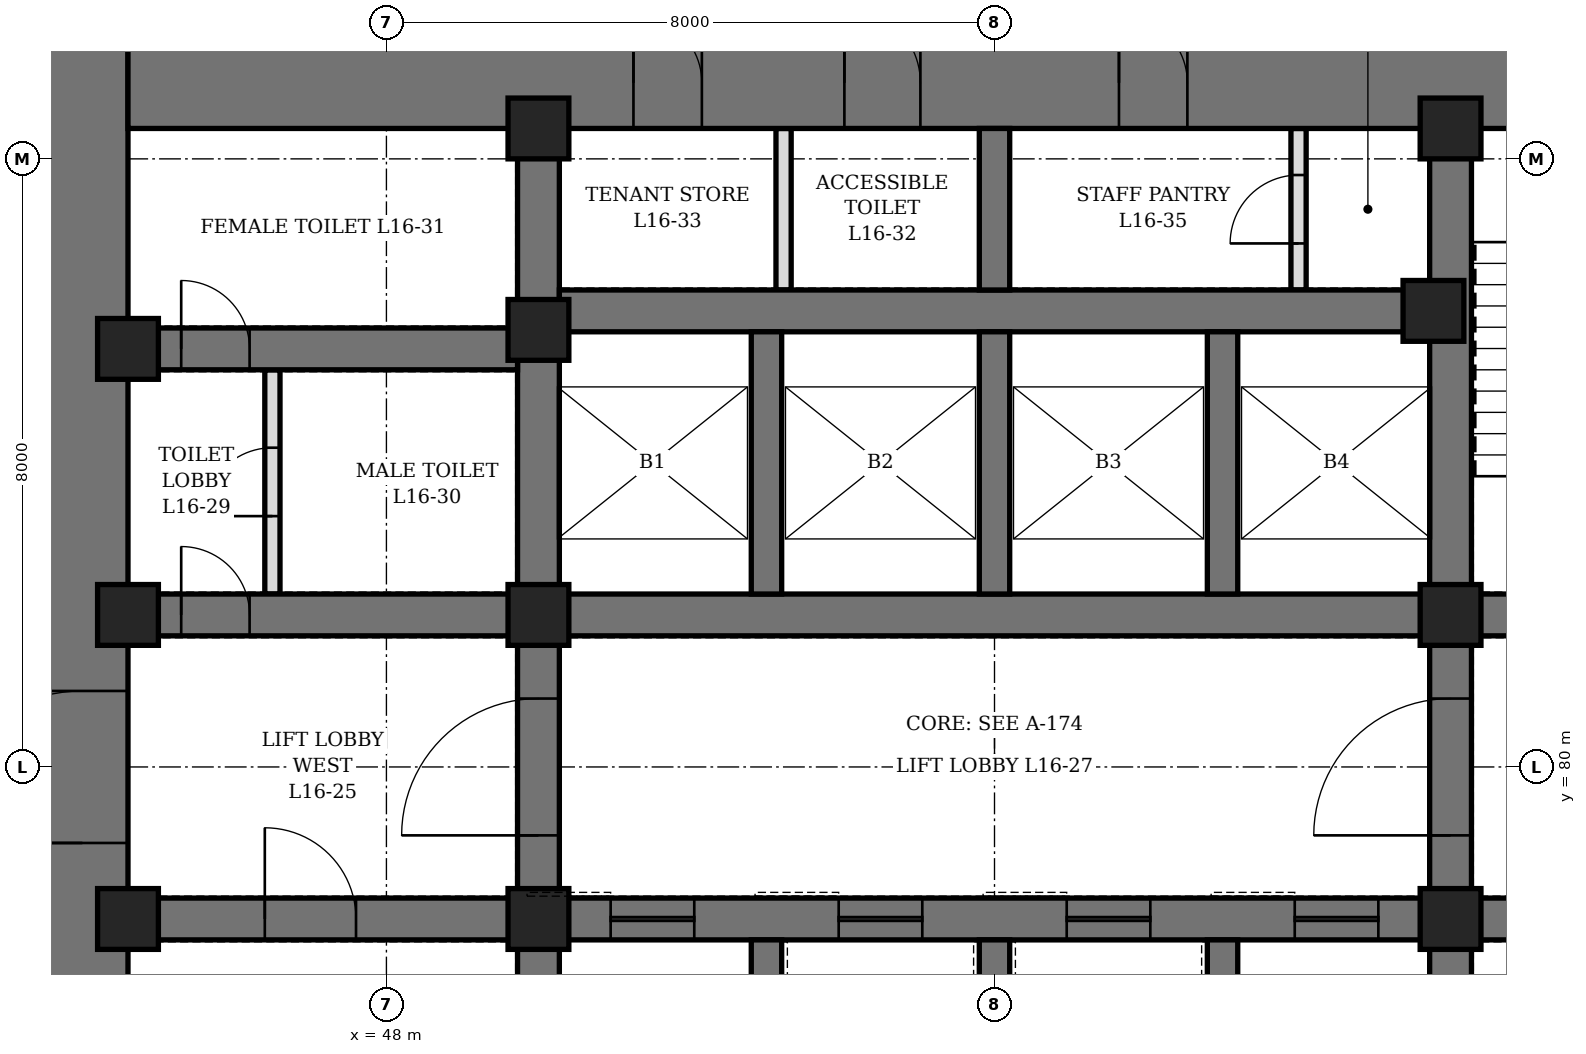
"""IFC4 building model, lengths in metres.
Left out: names, types, materials, properties, quantities, classifications, styles, units other than length and angle.
Written with IfcOpenShell. Run it as: python <this file> out.ifc"""

import sys

from ifc_helpers import new_model, si_unit, direction, frame, frame_2d, origin, origin_2d, place, context, subcontext, project, spatial, rectangle, hollow_rectangle, extrude, element, fill, save


model = new_model("IFC4")
c1 = context("Model", 3, precision=1e-05, world=origin(), true_north=direction((0.0, 1.0)))
c2 = subcontext(c1, "Body", "Model", "MODEL_VIEW")
j1 = project(units=[si_unit("LENGTHUNIT", "METRE"), si_unit("PLANEANGLEUNIT", "RADIAN")], contexts=[c1])
p1 = place(None, origin())
s1 = spatial("IfcSite", under=j1, at=p1, CompositionType="ELEMENT")
p2 = place(p1, origin())
s2 = spatial("IfcBuilding", under=s1, at=p2, CompositionType="ELEMENT")
p3 = place(p2, frame((0.0, 0.0, 76.9)))
s3 = spatial("IfcBuildingStorey", under=s2, at=p3, CompositionType="ELEMENT", Elevation=76.9)
p4 = place(p3, frame((44.0, 70.4, 0.0), z_axis=(0.0, 0.0, 1.0), x_axis=(0.0, 1.0, 0.0)))
e1 = element("IfcWall", 1, at=p4, inside=s3, PredefinedType="SHEAR", context=c2, shape_type="SweptSolid", body=[
    extrude(rectangle(XDim=19.2, YDim=1.2, at=frame_2d((9.6, 0.0))), origin(), (0.0, 0.0, 1.0), 4.2),
])
p5 = place(p4, frame((8.6, 0.0, 0.0)))
e2 = element("IfcOpeningElement", 2, at=p5, cuts=e1, PredefinedType="OPENING", context=c2, shape_type="SweptSolid", body=[
    extrude(rectangle(XDim=2.0, YDim=2.4, at=frame_2d((1.0, 1.2))), frame((0.0, 0.61, 0.0), z_axis=(0.0, -1.0, 0.0), x_axis=(1.0, 0.0, 0.0)), (0.0, 0.0, 1.0), 1.22),
])
p6 = place(p3, frame((44.6, 89.0, 0.0), z_axis=(0.0, 0.0, 1.0), x_axis=(1.0, 0.0, 0.0)))
e3 = element("IfcWall", 3, at=p6, inside=s3, PredefinedType="SHEAR", context=c2, shape_type="SweptSolid", body=[
    extrude(rectangle(XDim=22.8, YDim=1.2, at=frame_2d((11.4, 0.0))), origin(), (0.0, 0.0, 1.0), 4.2),
])
p7 = place(p6, frame((9.425, 0.0, 0.0)))
e4 = element("IfcOpeningElement", 4, at=p7, cuts=e3, PredefinedType="OPENING", context=c2, shape_type="SweptSolid", body=[
    extrude(rectangle(XDim=1.0, YDim=2.1, at=frame_2d((0.5, 1.05))), frame((0.0, 0.61, 0.0), z_axis=(0.0, -1.0, 0.0), x_axis=(1.0, 0.0, 0.0)), (0.0, 0.0, 1.0), 1.22),
])
p8 = place(p6, frame((6.65, 0.0, 0.0)))
e5 = element("IfcOpeningElement", 5, at=p8, cuts=e3, PredefinedType="OPENING", context=c2, shape_type="SweptSolid", body=[
    extrude(rectangle(XDim=0.9, YDim=2.1, at=frame_2d((0.45, 1.05))), frame((0.0, 0.61, 0.0), z_axis=(0.0, -1.0, 0.0), x_axis=(1.0, 0.0, 0.0)), (0.0, 0.0, 1.0), 1.22),
])
p9 = place(p6, frame((13.038, 0.0, 0.0)))
e6 = element("IfcOpeningElement", 6, at=p9, cuts=e3, PredefinedType="OPENING", context=c2, shape_type="SweptSolid", body=[
    extrude(rectangle(XDim=0.9, YDim=2.1, at=frame_2d((0.45, 1.05))), frame((0.0, 0.61, 0.0), z_axis=(0.0, -1.0, 0.0), x_axis=(1.0, 0.0, 0.0)), (0.0, 0.0, 1.0), 1.22),
])
p10 = place(p3, frame((50.0, 71.6, 0.0), z_axis=(0.0, 0.0, 1.0), x_axis=(0.0, 1.0, 0.0)))
e7 = element("IfcWall", 7, at=p10, inside=s3, PredefinedType="SHEAR", context=c2, shape_type="SweptSolid", body=[
    extrude(rectangle(XDim=16.8, YDim=0.55, at=frame_2d((8.4, 0.0))), origin(), (0.0, 0.0, 1.0), 4.2),
])
p11 = place(p10, frame((7.5, 0.0, 0.0)))
e8 = element("IfcOpeningElement", 8, at=p11, cuts=e7, PredefinedType="OPENING", context=c2, shape_type="SweptSolid", body=[
    extrude(rectangle(XDim=1.8, YDim=2.4, at=frame_2d((0.9, 1.2))), frame((0.0, 0.285, 0.0), z_axis=(0.0, -1.0, 0.0), x_axis=(1.0, 0.0, 0.0)), (0.0, 0.0, 1.0), 0.57),
])
p12 = place(p3, frame((62.0, 71.6, 0.0), z_axis=(0.0, 0.0, 1.0), x_axis=(0.0, 1.0, 0.0)))
e9 = element("IfcWall", 9, at=p12, inside=s3, PredefinedType="SHEAR", context=c2, shape_type="SweptSolid", body=[
    extrude(rectangle(XDim=16.8, YDim=0.55, at=frame_2d((8.4, 0.0))), origin(), (0.0, 0.0, 1.0), 4.2),
])
p13 = place(p12, frame((7.5, 0.0, 0.0)))
e10 = element("IfcOpeningElement", 10, at=p13, cuts=e9, PredefinedType="OPENING", context=c2, shape_type="SweptSolid", body=[
    extrude(rectangle(XDim=1.8, YDim=2.4, at=frame_2d((0.9, 1.2))), frame((0.0, 0.285, 0.0), z_axis=(0.0, -1.0, 0.0), x_axis=(1.0, 0.0, 0.0)), (0.0, 0.0, 1.0), 0.57),
])
p14 = place(p3, frame((44.6, 78.0, 0.0), z_axis=(0.0, 0.0, 1.0), x_axis=(1.0, 0.0, 0.0)))
e11 = element("IfcWall", 11, at=p14, inside=s3, PredefinedType="SHEAR", context=c2, shape_type="SweptSolid", body=[
    extrude(rectangle(XDim=5.125, YDim=0.55, at=frame_2d((2.562, 0.0))), origin(), (0.0, 0.0, 1.0), 4.2),
])
p15 = place(p14, frame((1.8, 0.0, 0.0)))
e12 = element("IfcOpeningElement", 12, at=p15, cuts=e11, PredefinedType="OPENING", context=c2, shape_type="SweptSolid", body=[
    extrude(rectangle(XDim=1.2, YDim=2.1, at=frame_2d((0.6, 1.05))), frame((0.0, 0.285, 0.0), z_axis=(0.0, -1.0, 0.0), x_axis=(1.0, 0.0, 0.0)), (0.0, 0.0, 1.0), 0.57),
])
p16 = place(p3, frame((44.6, 82.0, 0.0), z_axis=(0.0, 0.0, 1.0), x_axis=(1.0, 0.0, 0.0)))
e13 = element("IfcWall", 13, at=p16, inside=s3, PredefinedType="SHEAR", context=c2, shape_type="SweptSolid", body=[
    extrude(rectangle(XDim=5.125, YDim=0.55, at=frame_2d((2.562, 0.0))), origin(), (0.0, 0.0, 1.0), 4.2),
])
p17 = place(p16, frame((0.7, 0.0, 0.0)))
e14 = element("IfcOpeningElement", 14, at=p17, cuts=e13, PredefinedType="OPENING", context=c2, shape_type="SweptSolid", body=[
    extrude(rectangle(XDim=0.9, YDim=2.1, at=frame_2d((0.45, 1.05))), frame((0.0, 0.285, 0.0), z_axis=(0.0, -1.0, 0.0), x_axis=(1.0, 0.0, 0.0)), (0.0, 0.0, 1.0), 0.57),
])
p18 = place(p3, frame((44.6, 85.5, 0.0), z_axis=(0.0, 0.0, 1.0), x_axis=(1.0, 0.0, 0.0)))
e15 = element("IfcWall", 15, at=p18, inside=s3, PredefinedType="SHEAR", context=c2, shape_type="SweptSolid", body=[
    extrude(rectangle(XDim=5.125, YDim=0.55, at=frame_2d((2.562, 0.0))), origin(), (0.0, 0.0, 1.0), 4.2),
])
p19 = place(p18, frame((0.7, 0.0, 0.0)))
e16 = element("IfcOpeningElement", 16, at=p19, cuts=e15, PredefinedType="OPENING", context=c2, shape_type="SweptSolid", body=[
    extrude(rectangle(XDim=0.9, YDim=2.1, at=frame_2d((0.45, 1.05))), frame((0.0, 0.285, 0.0), z_axis=(0.0, -1.0, 0.0), x_axis=(1.0, 0.0, 0.0)), (0.0, 0.0, 1.0), 0.57),
])
p20 = place(p3, frame((62.275, 78.0, 0.0), z_axis=(0.0, 0.0, 1.0), x_axis=(1.0, 0.0, 0.0)))
e17 = element("IfcWall", 17, at=p20, inside=s3, PredefinedType="SHEAR", context=c2, shape_type="SweptSolid", body=[
    extrude(rectangle(XDim=5.125, YDim=0.55, at=frame_2d((2.562, 0.0))), origin(), (0.0, 0.0, 1.0), 4.2),
])
p21 = place(p20, frame((2.125, 0.0, 0.0)))
e18 = element("IfcOpeningElement", 18, at=p21, cuts=e17, PredefinedType="OPENING", context=c2, shape_type="SweptSolid", body=[
    extrude(rectangle(XDim=1.2, YDim=2.1, at=frame_2d((0.6, 1.05))), frame((0.0, 0.285, 0.0), z_axis=(0.0, -1.0, 0.0), x_axis=(1.0, 0.0, 0.0)), (0.0, 0.0, 1.0), 0.57),
])
p22 = place(p3, frame((62.275, 82.0, 0.0), z_axis=(0.0, 0.0, 1.0), x_axis=(1.0, 0.0, 0.0)))
e19 = element("IfcWall", 19, at=p22, inside=s3, PredefinedType="SHEAR", context=c2, shape_type="SweptSolid", body=[
    extrude(rectangle(XDim=5.125, YDim=0.55, at=frame_2d((2.562, 0.0))), origin(), (0.0, 0.0, 1.0), 4.2),
])
p23 = place(p22, frame((2.125, 0.0, 0.0)))
e20 = element("IfcOpeningElement", 20, at=p23, cuts=e19, PredefinedType="OPENING", context=c2, shape_type="SweptSolid", body=[
    extrude(rectangle(XDim=1.2, YDim=2.1, at=frame_2d((0.6, 1.05))), frame((0.0, 0.285, 0.0), z_axis=(0.0, -1.0, 0.0), x_axis=(1.0, 0.0, 0.0)), (0.0, 0.0, 1.0), 0.57),
])
p24 = place(p3, frame((50.275, 78.0, 0.0), z_axis=(0.0, 0.0, 1.0), x_axis=(1.0, 0.0, 0.0)))
e21 = element("IfcWall", 21, at=p24, inside=s3, PredefinedType="SHEAR", context=c2, shape_type="SweptSolid", body=[
    extrude(rectangle(XDim=11.45, YDim=0.55, at=frame_2d((5.725, 0.0))), origin(), (0.0, 0.0, 1.0), 4.2),
])
p25 = place(p24, frame((0.675, 0.0, 0.0)))
e22 = element("IfcOpeningElement", 22, at=p25, cuts=e21, PredefinedType="OPENING", context=c2, shape_type="SweptSolid", body=[
    extrude(rectangle(XDim=1.1, YDim=2.2, at=frame_2d((0.55, 1.1))), frame((0.0, 0.285, 0.0), z_axis=(0.0, -1.0, 0.0), x_axis=(1.0, 0.0, 0.0)), (0.0, 0.0, 1.0), 0.57),
])
p26 = place(p24, frame((3.675, 0.0, 0.0)))
e23 = element("IfcOpeningElement", 23, at=p26, cuts=e21, PredefinedType="OPENING", context=c2, shape_type="SweptSolid", body=[
    extrude(rectangle(XDim=1.1, YDim=2.2, at=frame_2d((0.55, 1.1))), frame((0.0, 0.285, 0.0), z_axis=(0.0, -1.0, 0.0), x_axis=(1.0, 0.0, 0.0)), (0.0, 0.0, 1.0), 0.57),
])
p27 = place(p24, frame((6.675, 0.0, 0.0)))
e24 = element("IfcOpeningElement", 24, at=p27, cuts=e21, PredefinedType="OPENING", context=c2, shape_type="SweptSolid", body=[
    extrude(rectangle(XDim=1.1, YDim=2.2, at=frame_2d((0.55, 1.1))), frame((0.0, 0.285, 0.0), z_axis=(0.0, -1.0, 0.0), x_axis=(1.0, 0.0, 0.0)), (0.0, 0.0, 1.0), 0.57),
])
p28 = place(p24, frame((9.675, 0.0, 0.0)))
e25 = element("IfcOpeningElement", 25, at=p28, cuts=e21, PredefinedType="OPENING", context=c2, shape_type="SweptSolid", body=[
    extrude(rectangle(XDim=1.1, YDim=2.2, at=frame_2d((0.55, 1.1))), frame((0.0, 0.285, 0.0), z_axis=(0.0, -1.0, 0.0), x_axis=(1.0, 0.0, 0.0)), (0.0, 0.0, 1.0), 0.57),
])
for number, where, z_axis, x_axis in (
    (26, (50.275, 82.0, 0.0), (0.0, 0.0, 1.0), (1.0, 0.0, 0.0)),
    (27, (50.275, 86.0, 0.0), (0.0, 0.0, 1.0), (1.0, 0.0, 0.0)),
):
    element("IfcWall", number, at=place(p3, frame(where, z_axis=z_axis, x_axis=x_axis)), inside=s3, PredefinedType="SHEAR", context=c2, shape_type="SweptSolid", body=[
        extrude(rectangle(XDim=11.45, YDim=0.55, at=frame_2d((5.725, 0.0))), origin(), (0.0, 0.0, 1.0), 4.2),
    ])
p29 = place(p3, frame((53.0, 74.2, 0.0), z_axis=(0.0, 0.0, 1.0), x_axis=(0.0, 1.0, 0.0)))
e28 = element("IfcWall", 28, at=p29, inside=s3, PredefinedType="SHEAR", context=c2, shape_type="SweptSolid", body=[
    extrude(rectangle(XDim=3.525, YDim=0.4, at=frame_2d((1.763, 0.0))), origin(), (0.0, 0.0, 1.0), 4.2),
])
p30 = place(p3, frame((53.0, 82.275, 0.0), z_axis=(0.0, 0.0, 1.0), x_axis=(0.0, 1.0, 0.0)))
e29 = element("IfcWall", 29, at=p30, inside=s3, PredefinedType="SHEAR", context=c2, shape_type="SweptSolid", body=[
    extrude(rectangle(XDim=3.45, YDim=0.4, at=frame_2d((1.725, 0.0))), origin(), (0.0, 0.0, 1.0), 4.2),
])
p31 = place(p3, frame((56.0, 74.2, 0.0), z_axis=(0.0, 0.0, 1.0), x_axis=(0.0, 1.0, 0.0)))
e30 = element("IfcWall", 30, at=p31, inside=s3, PredefinedType="SHEAR", context=c2, shape_type="SweptSolid", body=[
    extrude(rectangle(XDim=3.525, YDim=0.4, at=frame_2d((1.763, 0.0))), origin(), (0.0, 0.0, 1.0), 4.2),
])
p32 = place(p3, frame((56.0, 82.275, 0.0), z_axis=(0.0, 0.0, 1.0), x_axis=(0.0, 1.0, 0.0)))
e31 = element("IfcWall", 31, at=p32, inside=s3, PredefinedType="SHEAR", context=c2, shape_type="SweptSolid", body=[
    extrude(rectangle(XDim=3.45, YDim=0.4, at=frame_2d((1.725, 0.0))), origin(), (0.0, 0.0, 1.0), 4.2),
])
p33 = place(p3, frame((59.0, 74.2, 0.0), z_axis=(0.0, 0.0, 1.0), x_axis=(0.0, 1.0, 0.0)))
e32 = element("IfcWall", 32, at=p33, inside=s3, PredefinedType="SHEAR", context=c2, shape_type="SweptSolid", body=[
    extrude(rectangle(XDim=3.525, YDim=0.4, at=frame_2d((1.763, 0.0))), origin(), (0.0, 0.0, 1.0), 4.2),
])
p34 = place(p3, frame((59.0, 82.275, 0.0), z_axis=(0.0, 0.0, 1.0), x_axis=(0.0, 1.0, 0.0)))
e33 = element("IfcWall", 33, at=p34, inside=s3, PredefinedType="SHEAR", context=c2, shape_type="SweptSolid", body=[
    extrude(rectangle(XDim=3.45, YDim=0.4, at=frame_2d((1.725, 0.0))), origin(), (0.0, 0.0, 1.0), 4.2),
])
p35 = place(p3, frame((56.0, 86.275, 0.0), z_axis=(0.0, 0.0, 1.0), x_axis=(0.0, 1.0, 0.0)))
e34 = element("IfcWall", 34, at=p35, inside=s3, PredefinedType="SHEAR", context=c2, shape_type="SweptSolid", body=[
    extrude(rectangle(XDim=2.125, YDim=0.4, at=frame_2d((1.062, 0.0))), origin(), (0.0, 0.0, 1.0), 4.2),
])
for number, where, z_axis, x_axis in (
    (35, (44.6, 78.0, 0.0), (0.0, 0.0, 1.0), (1.0, 0.0, 0.0)),
    (36, (44.6, 82.0, 0.0), (0.0, 0.0, 1.0), (1.0, 0.0, 0.0)),
    (37, (44.6, 85.5, 0.0), (0.0, 0.0, 1.0), (1.0, 0.0, 0.0)),
    (38, (50.0, 78.0, 0.0), (0.0, 0.0, 1.0), (1.0, 0.0, 0.0)),
    (39, (50.0, 82.0, 0.0), (0.0, 0.0, 1.0), (1.0, 0.0, 0.0)),
    (40, (50.0, 85.75, 0.0), (0.0, 0.0, 1.0), (1.0, 0.0, 0.0)),
    (41, (50.0, 88.4, 0.0), (0.0, 0.0, 1.0), (1.0, 0.0, 0.0)),
    (42, (61.775, 86.0, 0.0), (0.0, 0.0, 1.0), (1.0, 0.0, 0.0)),
    (43, (62.0, 78.0, 0.0), (0.0, 0.0, 1.0), (1.0, 0.0, 0.0)),
    (44, (62.0, 82.0, 0.0), (0.0, 0.0, 1.0), (1.0, 0.0, 0.0)),
    (45, (62.0, 88.4, 0.0), (0.0, 0.0, 1.0), (1.0, 0.0, 0.0)),
):
    element("IfcColumn", number, at=place(p3, frame(where, z_axis=z_axis, x_axis=x_axis)), inside=s3, PredefinedType="COLUMN", context=c2, shape_type="SweptSolid", body=[
        extrude(hollow_rectangle(XDim=0.8, YDim=0.8, WallThickness=0.1, at=origin_2d()), origin(), (0.0, 0.0, 1.0), 4.2),
    ])
p36 = place(p3, frame((46.5, 82.275, 0.0), z_axis=(0.0, 0.0, 1.0), x_axis=(0.0, 1.0, 0.0)))
e46 = element("IfcWall", 46, at=p36, inside=s3, PredefinedType="PARTITIONING", context=c2, shape_type="SweptSolid", body=[
    extrude(rectangle(XDim=2.95, YDim=0.2, at=frame_2d((1.475, 0.0))), origin(), (0.0, 0.0, 1.0), 4.04),
])
p37 = place(p36, frame((1.025, 0.0, 0.0)))
e47 = element("IfcOpeningElement", 47, at=p37, cuts=e46, PredefinedType="OPENING", context=c2, shape_type="SweptSolid", body=[
    extrude(rectangle(XDim=0.9, YDim=2.1, at=frame_2d((0.45, 1.05))), frame((0.0, 0.11, 0.0), z_axis=(0.0, -1.0, 0.0), x_axis=(1.0, 0.0, 0.0)), (0.0, 0.0, 1.0), 0.22),
])
p38 = place(p3, frame((53.225, 86.275, 0.0), z_axis=(0.0, 0.0, 1.0), x_axis=(0.0, 1.0, 0.0)))
e48 = element("IfcWall", 48, at=p38, inside=s3, PredefinedType="PARTITIONING", context=c2, shape_type="SweptSolid", body=[
    extrude(rectangle(XDim=2.125, YDim=0.2, at=frame_2d((1.062, 0.0))), origin(), (0.0, 0.0, 1.0), 4.04),
])
p39 = place(p3, frame((60.0, 86.275, 0.0), z_axis=(0.0, 0.0, 1.0), x_axis=(0.0, 1.0, 0.0)))
e49 = element("IfcWall", 49, at=p39, inside=s3, PredefinedType="PARTITIONING", context=c2, shape_type="SweptSolid", body=[
    extrude(rectangle(XDim=2.125, YDim=0.2, at=frame_2d((1.062, 0.0))), origin(), (0.0, 0.0, 1.0), 4.04),
])
p40 = place(p39, frame((0.613, 0.0, 0.0)))
e50 = element("IfcOpeningElement", 50, at=p40, cuts=e49, PredefinedType="OPENING", context=c2, shape_type="SweptSolid", body=[
    extrude(rectangle(XDim=0.9, YDim=2.1, at=frame_2d((0.45, 1.05))), frame((0.0, 0.11, 0.0), z_axis=(0.0, -1.0, 0.0), x_axis=(1.0, 0.0, 0.0)), (0.0, 0.0, 1.0), 0.22),
])
p41 = place(p17, origin())
e51 = element("IfcDoor", 51, at=p41, inside=s3, OperationType="SINGLE_SWING_LEFT", PredefinedType="DOOR", context=c2, shape_type="SweptSolid", body=[
    extrude(rectangle(XDim=0.9, YDim=2.1, at=frame_2d((0.45, 1.05))), frame((0.0, 0.275, 0.0), z_axis=(0.0, -1.0, 0.0), x_axis=(1.0, 0.0, 0.0)), (0.0, 0.0, 1.0), 0.55),
])
fill(e14, e51)
p42 = place(p37, origin())
e52 = element("IfcDoor", 52, at=p42, inside=s3, OperationType="SINGLE_SWING_RIGHT", PredefinedType="DOOR", context=c2, shape_type="SweptSolid", body=[
    extrude(rectangle(XDim=0.9, YDim=2.1, at=frame_2d((0.45, 1.05))), frame((0.0, 0.1, 0.0), z_axis=(0.0, -1.0, 0.0), x_axis=(1.0, 0.0, 0.0)), (0.0, 0.0, 1.0), 0.199),
])
fill(e47, e52)
p43 = place(p19, origin())
e53 = element("IfcDoor", 53, at=p43, inside=s3, OperationType="SINGLE_SWING_RIGHT", PredefinedType="DOOR", context=c2, shape_type="SweptSolid", body=[
    extrude(rectangle(XDim=0.9, YDim=2.1, at=frame_2d((0.45, 1.05))), frame((0.0, 0.275, 0.0), z_axis=(0.0, -1.0, 0.0), x_axis=(1.0, 0.0, 0.0)), (0.0, 0.0, 1.0), 0.55),
])
fill(e16, e53)
p44 = place(p7, origin())
e54 = element("IfcDoor", 54, at=p44, inside=s3, OperationType="SINGLE_SWING_LEFT", PredefinedType="DOOR", context=c2, shape_type="SweptSolid", body=[
    extrude(rectangle(XDim=1.0, YDim=2.1, at=frame_2d((0.5, 1.05))), frame((0.0, 0.35, 0.0), z_axis=(0.0, -1.0, 0.0), x_axis=(1.0, 0.0, 0.0)), (0.0, 0.0, 1.0), 0.7),
])
fill(e4, e54)
p45 = place(p8, origin())
e55 = element("IfcDoor", 55, at=p45, inside=s3, OperationType="SINGLE_SWING_LEFT", PredefinedType="DOOR", context=c2, shape_type="SweptSolid", body=[
    extrude(rectangle(XDim=0.9, YDim=2.1, at=frame_2d((0.45, 1.05))), frame((0.0, 0.35, 0.0), z_axis=(0.0, -1.0, 0.0), x_axis=(1.0, 0.0, 0.0)), (0.0, 0.0, 1.0), 0.7),
])
fill(e5, e55)
p46 = place(p9, origin())
e56 = element("IfcDoor", 56, at=p46, inside=s3, OperationType="SINGLE_SWING_LEFT", PredefinedType="DOOR", context=c2, shape_type="SweptSolid", body=[
    extrude(rectangle(XDim=0.9, YDim=2.1, at=frame_2d((0.45, 1.05))), frame((0.0, 0.35, 0.0), z_axis=(0.0, -1.0, 0.0), x_axis=(1.0, 0.0, 0.0)), (0.0, 0.0, 1.0), 0.7),
])
fill(e6, e56)
p47 = place(p40, origin())
e57 = element("IfcDoor", 57, at=p47, inside=s3, OperationType="SINGLE_SWING_LEFT", PredefinedType="DOOR", context=c2, shape_type="SweptSolid", body=[
    extrude(rectangle(XDim=0.9, YDim=2.1, at=frame_2d((0.45, 1.05))), frame((0.0, 0.1, 0.0), z_axis=(0.0, -1.0, 0.0), x_axis=(1.0, 0.0, 0.0)), (0.0, 0.0, 1.0), 0.199),
])
fill(e50, e57)
p48 = place(p15, origin())
e58 = element("IfcDoor", 58, at=p48, inside=s3, OperationType="SINGLE_SWING_LEFT", PredefinedType="DOOR", context=c2, shape_type="SweptSolid", body=[
    extrude(rectangle(XDim=1.2, YDim=2.1, at=frame_2d((0.6, 1.05))), frame((0.0, 0.275, 0.0), z_axis=(0.0, -1.0, 0.0), x_axis=(1.0, 0.0, 0.0)), (0.0, 0.0, 1.0), 0.55),
])
fill(e12, e58)
p49 = place(p5, origin())
e59 = element("IfcDoor", 59, at=p49, inside=s3, OperationType="DOUBLE_DOOR_SINGLE_SWING", PredefinedType="DOOR", context=c2, shape_type="SweptSolid", body=[
    extrude(rectangle(XDim=2.0, YDim=2.4, at=frame_2d((1.0, 1.2))), frame((0.0, 0.35, 0.0), z_axis=(0.0, -1.0, 0.0), x_axis=(1.0, 0.0, 0.0)), (0.0, 0.0, 1.0), 0.7),
])
fill(e2, e59)
p50 = place(p11, origin())
e60 = element("IfcDoor", 60, at=p50, inside=s3, OperationType="DOUBLE_DOOR_SINGLE_SWING", PredefinedType="DOOR", context=c2, shape_type="SweptSolid", body=[
    extrude(rectangle(XDim=1.8, YDim=2.4, at=frame_2d((0.9, 1.2))), frame((0.0, 0.275, 0.0), z_axis=(0.0, -1.0, 0.0), x_axis=(1.0, 0.0, 0.0)), (0.0, 0.0, 1.0), 0.55),
])
fill(e8, e60)
p51 = place(p13, origin())
e61 = element("IfcDoor", 61, at=p51, inside=s3, OperationType="DOUBLE_DOOR_SINGLE_SWING", PredefinedType="DOOR", context=c2, shape_type="SweptSolid", body=[
    extrude(rectangle(XDim=1.8, YDim=2.4, at=frame_2d((0.9, 1.2))), frame((0.0, 0.275, 0.0), z_axis=(0.0, -1.0, 0.0), x_axis=(1.0, 0.0, 0.0)), (0.0, 0.0, 1.0), 0.55),
])
fill(e10, e61)
p52 = place(p25, origin())
e62 = element("IfcDoor", 62, at=p52, inside=s3, OperationType="SLIDING_TO_LEFT", PredefinedType="DOOR", context=c2, shape_type="SweptSolid", body=[
    extrude(rectangle(XDim=1.1, YDim=2.2, at=frame_2d((0.55, 1.1))), frame((0.0, 0.275, 0.0), z_axis=(0.0, -1.0, 0.0), x_axis=(1.0, 0.0, 0.0)), (0.0, 0.0, 1.0), 0.55),
])
fill(e22, e62)
p53 = place(p26, origin())
e63 = element("IfcDoor", 63, at=p53, inside=s3, OperationType="SLIDING_TO_LEFT", PredefinedType="DOOR", context=c2, shape_type="SweptSolid", body=[
    extrude(rectangle(XDim=1.1, YDim=2.2, at=frame_2d((0.55, 1.1))), frame((0.0, 0.275, 0.0), z_axis=(0.0, -1.0, 0.0), x_axis=(1.0, 0.0, 0.0)), (0.0, 0.0, 1.0), 0.55),
])
fill(e23, e63)
p54 = place(p27, origin())
e64 = element("IfcDoor", 64, at=p54, inside=s3, OperationType="SLIDING_TO_LEFT", PredefinedType="DOOR", context=c2, shape_type="SweptSolid", body=[
    extrude(rectangle(XDim=1.1, YDim=2.2, at=frame_2d((0.55, 1.1))), frame((0.0, 0.275, 0.0), z_axis=(0.0, -1.0, 0.0), x_axis=(1.0, 0.0, 0.0)), (0.0, 0.0, 1.0), 0.55),
])
fill(e24, e64)
p55 = place(p28, origin())
e65 = element("IfcDoor", 65, at=p55, inside=s3, OperationType="SLIDING_TO_LEFT", PredefinedType="DOOR", context=c2, shape_type="SweptSolid", body=[
    extrude(rectangle(XDim=1.1, YDim=2.2, at=frame_2d((0.55, 1.1))), frame((0.0, 0.275, 0.0), z_axis=(0.0, -1.0, 0.0), x_axis=(1.0, 0.0, 0.0)), (0.0, 0.0, 1.0), 0.55),
])
fill(e25, e65)
save(model, sys.argv[1])
